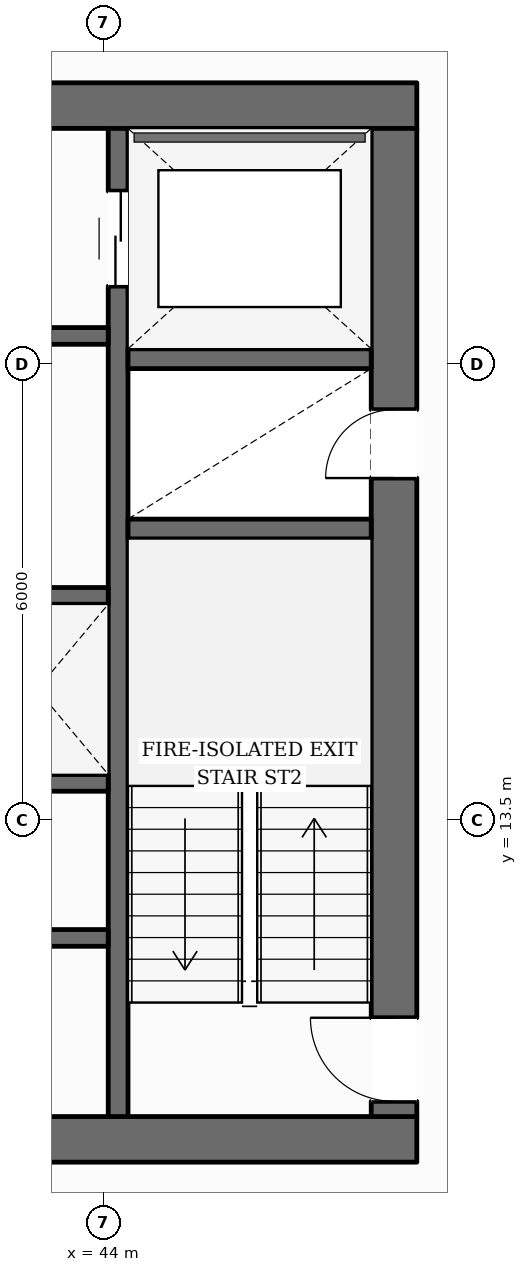
"""IFC4 building model, lengths in metres.
Left out: names, types, materials, properties, quantities, classifications, styles, units other than length and angle.
Written with IfcOpenShell. Run it as: python <this file> out.ifc"""

import sys

from ifc_helpers import new_model, si_unit, direction, frame, frame_2d, origin, place, context, subcontext, project, spatial, rectangle, extrude, element, fill, save


model = new_model("IFC4")
c1 = context("Model", 3, precision=1e-05, world=origin(), true_north=direction((0.0, 1.0)))
c2 = subcontext(c1, "Body", "Model", "MODEL_VIEW")
j1 = project(units=[si_unit("LENGTHUNIT", "METRE"), si_unit("PLANEANGLEUNIT", "RADIAN")], contexts=[c1])
p1 = place(None, origin())
s1 = spatial("IfcSite", under=j1, at=p1, CompositionType="ELEMENT")
p2 = place(p1, origin())
s2 = spatial("IfcBuilding", under=s1, at=p2, CompositionType="ELEMENT")
p3 = place(p2, frame((0.0, 0.0, 56.05)))
s3 = spatial("IfcBuildingStorey", under=s2, at=p3, CompositionType="ELEMENT", Elevation=56.05)
p4 = place(p3, frame((27.88, 9.3, 0.0), z_axis=(0.0, 0.0, 1.0), x_axis=(1.0, 0.0, 0.0)))
e1 = element("IfcWall", 1, at=p4, inside=s3, PredefinedType="SOLIDWALL", context=c2, shape_type="SweptSolid", body=[
    extrude(rectangle(XDim=20.24, YDim=0.6, at=frame_2d((10.12, 0.0))), origin(), (0.0, 0.0, 1.0), 3.59),
])
p5 = place(p4, frame((10.62, 0.0, 0.0)))
e2 = element("IfcOpeningElement", 2, at=p5, cuts=e1, PredefinedType="OPENING", context=c2, shape_type="SweptSolid", body=[
    extrude(rectangle(XDim=1.4, YDim=2.2, at=frame_2d((0.7, 1.1))), frame((0.0, 0.31, 0.0), z_axis=(0.0, -1.0, 0.0), x_axis=(1.0, 0.0, 0.0)), (0.0, 0.0, 1.0), 0.62),
])
p6 = place(p3, frame((27.88, 22.9, 0.0), z_axis=(0.0, 0.0, 1.0), x_axis=(1.0, 0.0, 0.0)))
e3 = element("IfcWall", 3, at=p6, inside=s3, PredefinedType="SOLIDWALL", context=c2, shape_type="SweptSolid", body=[
    extrude(rectangle(XDim=20.24, YDim=0.6, at=frame_2d((10.12, 0.0))), origin(), (0.0, 0.0, 1.0), 3.59),
])
p7 = place(p6, frame((6.395, 0.0, 0.0)))
e4 = element("IfcOpeningElement", 4, at=p7, cuts=e3, PredefinedType="OPENING", context=c2, shape_type="SweptSolid", body=[
    extrude(rectangle(XDim=1.05, YDim=2.15, at=frame_2d((0.525, 1.075))), frame((0.0, 0.31, 0.0), z_axis=(0.0, -1.0, 0.0), x_axis=(1.0, 0.0, 0.0)), (0.0, 0.0, 1.0), 0.62),
])
p8 = place(p6, frame((12.795, 0.0, 0.0)))
e5 = element("IfcOpeningElement", 5, at=p8, cuts=e3, PredefinedType="OPENING", context=c2, shape_type="SweptSolid", body=[
    extrude(rectangle(XDim=1.05, YDim=2.15, at=frame_2d((0.525, 1.075))), frame((0.0, 0.31, 0.0), z_axis=(0.0, -1.0, 0.0), x_axis=(1.0, 0.0, 0.0)), (0.0, 0.0, 1.0), 0.62),
])
p9 = place(p3, frame((47.82, 9.6, 0.0), z_axis=(0.0, 0.0, 1.0), x_axis=(0.0, 1.0, 0.0)))
e6 = element("IfcWall", 6, at=p9, inside=s3, PredefinedType="SOLIDWALL", context=c2, shape_type="SweptSolid", body=[
    extrude(rectangle(XDim=13.0, YDim=0.6, at=frame_2d((6.5, 0.0))), origin(), (0.0, 0.0, 1.0), 3.59),
])
p10 = place(p9, frame((0.2, 0.0, 0.0)))
e7 = element("IfcOpeningElement", 7, at=p10, cuts=e6, PredefinedType="OPENING", context=c2, shape_type="SweptSolid", body=[
    extrude(rectangle(XDim=1.1, YDim=2.15, at=frame_2d((0.55, 1.075))), frame((0.0, 0.31, 0.0), z_axis=(0.0, -1.0, 0.0), x_axis=(1.0, 0.0, 0.0)), (0.0, 0.0, 1.0), 0.62),
])
p11 = place(p9, frame((8.4, 0.0, 0.0)))
e8 = element("IfcOpeningElement", 8, at=p11, cuts=e6, PredefinedType="OPENING", context=c2, shape_type="SweptSolid", body=[
    extrude(rectangle(XDim=0.9, YDim=2.1, at=frame_2d((0.45, 1.05))), frame((0.0, 0.31, 0.0), z_axis=(0.0, -1.0, 0.0), x_axis=(1.0, 0.0, 0.0)), (0.0, 0.0, 1.0), 0.62),
])
p12 = place(p3, frame((44.19, 9.6, 0.0), z_axis=(0.0, 0.0, 1.0), x_axis=(0.0, 1.0, 0.0)))
e9 = element("IfcWall", 9, at=p12, inside=s3, PredefinedType="SHEAR", context=c2, shape_type="SweptSolid", body=[
    extrude(rectangle(XDim=13.0, YDim=0.26, at=frame_2d((6.5, 0.0))), origin(), (0.0, 0.0, 1.0), 3.59),
])
p13 = place(p12, frame((10.925, 0.0, 0.0)))
e10 = element("IfcOpeningElement", 10, at=p13, cuts=e9, PredefinedType="OPENING", context=c2, shape_type="SweptSolid", body=[
    extrude(rectangle(XDim=1.25, YDim=2.25, at=frame_2d((0.625, 1.125))), frame((0.0, 0.14, 0.0), z_axis=(0.0, -1.0, 0.0), x_axis=(1.0, 0.0, 0.0)), (0.0, 0.0, 1.0), 0.28),
])
for number, where, z_axis, x_axis in (
    (11, (44.32, 17.33, 0.0), (0.0, 0.0, 1.0), (1.0, 0.0, 0.0)),
    (12, (44.32, 19.57, 0.0), (0.0, 0.0, 1.0), (1.0, 0.0, 0.0)),
):
    element("IfcWall", number, at=place(p3, frame(where, z_axis=z_axis, x_axis=x_axis)), inside=s3, PredefinedType="SHEAR", context=c2, shape_type="SweptSolid", body=[
        extrude(rectangle(XDim=3.2, YDim=0.26, at=frame_2d((1.6, 0.0))), origin(), (0.0, 0.0, 1.0), 3.59),
    ])
p14 = place(p3, frame((31.94, 19.87, 0.0), z_axis=(0.0, 0.0, 1.0), x_axis=(1.0, 0.0, 0.0)))
e13 = element("IfcWall", 13, at=p14, inside=s3, PredefinedType="SOLIDWALL", context=c2, shape_type="SweptSolid", body=[
    extrude(rectangle(XDim=12.12, YDim=0.22, at=frame_2d((6.06, 0.0))), origin(), (0.0, 0.0, 1.0), 3.59),
])
p15 = place(p14, frame((6.3, 0.0, 0.0)))
e14 = element("IfcOpeningElement", 14, at=p15, cuts=e13, PredefinedType="OPENING", context=c2, shape_type="SweptSolid", body=[
    extrude(rectangle(XDim=1.1, YDim=2.15, at=frame_2d((0.55, 1.075))), frame((0.0, 0.12, 0.0), z_axis=(0.0, -1.0, 0.0), x_axis=(1.0, 0.0, 0.0)), (0.0, 0.0, 1.0), 0.24),
])
p16 = place(p14, frame((8.23, 0.0, 0.0)))
e15 = element("IfcOpeningElement", 15, at=p16, cuts=e13, PredefinedType="OPENING", context=c2, shape_type="SweptSolid", body=[
    extrude(rectangle(XDim=0.9, YDim=2.1, at=frame_2d((0.45, 1.05))), frame((0.0, 0.12, 0.0), z_axis=(0.0, -1.0, 0.0), x_axis=(1.0, 0.0, 0.0)), (0.0, 0.0, 1.0), 0.24),
])
p17 = place(p14, frame((10.45, 0.0, 0.0)))
e16 = element("IfcOpeningElement", 16, at=p17, cuts=e13, PredefinedType="OPENING", context=c2, shape_type="SweptSolid", body=[
    extrude(rectangle(XDim=0.9, YDim=2.1, at=frame_2d((0.45, 1.05))), frame((0.0, 0.12, 0.0), z_axis=(0.0, -1.0, 0.0), x_axis=(1.0, 0.0, 0.0)), (0.0, 0.0, 1.0), 0.24),
])
p18 = place(p3, frame((31.94, 16.45, 0.0), z_axis=(0.0, 0.0, 1.0), x_axis=(1.0, 0.0, 0.0)))
e17 = element("IfcWall", 17, at=p18, inside=s3, PredefinedType="SOLIDWALL", context=c2, shape_type="SweptSolid", body=[
    extrude(rectangle(XDim=12.12, YDim=0.22, at=frame_2d((6.06, 0.0))), origin(), (0.0, 0.0, 1.0), 3.59),
])
p19 = place(p3, frame((31.94, 13.99, 0.0), z_axis=(0.0, 0.0, 1.0), x_axis=(1.0, 0.0, 0.0)))
e18 = element("IfcWall", 18, at=p19, inside=s3, PredefinedType="SOLIDWALL", context=c2, shape_type="SweptSolid", body=[
    extrude(rectangle(XDim=12.12, YDim=0.22, at=frame_2d((6.06, 0.0))), origin(), (0.0, 0.0, 1.0), 3.59),
])
p20 = place(p19, frame((0.385, 0.0, 0.0)))
e19 = element("IfcOpeningElement", 19, at=p20, cuts=e18, PredefinedType="OPENING", context=c2, shape_type="SweptSolid", body=[
    extrude(rectangle(XDim=1.1, YDim=2.2, at=frame_2d((0.55, 1.1))), frame((0.0, 0.12, 0.0), z_axis=(0.0, -1.0, 0.0), x_axis=(1.0, 0.0, 0.0)), (0.0, 0.0, 1.0), 0.24),
])
p21 = place(p19, frame((2.435, 0.0, 0.0)))
e20 = element("IfcOpeningElement", 20, at=p21, cuts=e18, PredefinedType="OPENING", context=c2, shape_type="SweptSolid", body=[
    extrude(rectangle(XDim=1.1, YDim=2.2, at=frame_2d((0.55, 1.1))), frame((0.0, 0.12, 0.0), z_axis=(0.0, -1.0, 0.0), x_axis=(1.0, 0.0, 0.0)), (0.0, 0.0, 1.0), 0.24),
])
p22 = place(p19, frame((4.485, 0.0, 0.0)))
e21 = element("IfcOpeningElement", 21, at=p22, cuts=e18, PredefinedType="OPENING", context=c2, shape_type="SweptSolid", body=[
    extrude(rectangle(XDim=1.1, YDim=2.2, at=frame_2d((0.55, 1.1))), frame((0.0, 0.12, 0.0), z_axis=(0.0, -1.0, 0.0), x_axis=(1.0, 0.0, 0.0)), (0.0, 0.0, 1.0), 0.24),
])
p23 = place(p3, frame((40.28, 11.95, 0.0), z_axis=(0.0, 0.0, 1.0), x_axis=(1.0, 0.0, 0.0)))
e22 = element("IfcWall", 22, at=p23, inside=s3, PredefinedType="SOLIDWALL", context=c2, shape_type="SweptSolid", body=[
    extrude(rectangle(XDim=3.78, YDim=0.22, at=frame_2d((1.89, 0.0))), origin(), (0.0, 0.0, 1.0), 3.59),
])
p24 = place(p23, frame((1.55, 0.0, 0.0)))
e23 = element("IfcOpeningElement", 23, at=p24, cuts=e22, PredefinedType="OPENING", context=c2, shape_type="SweptSolid", body=[
    extrude(rectangle(XDim=0.9, YDim=2.1, at=frame_2d((0.45, 1.05))), frame((0.0, 0.12, 0.0), z_axis=(0.0, -1.0, 0.0), x_axis=(1.0, 0.0, 0.0)), (0.0, 0.0, 1.0), 0.24),
])
p25 = place(p3, frame((45.376, 44.376, 0.0), z_axis=(0.0, 0.0, 1.0), x_axis=(0.505310833403, -0.862937403087, 0.0)))
e24 = element("IfcWall", 24, at=p25, inside=s3, PredefinedType="STANDARD", context=c2, shape_type="SweptSolid", body=[
    extrude(rectangle(XDim=35.544, YDim=0.38, at=frame_2d((17.772, 0.0))), origin(), (0.0, 0.0, 1.0), 2.97),
])
p26 = place(p25, frame((8.486, 0.0, 0.0)))
e25 = element("IfcOpeningElement", 25, at=p26, cuts=e24, PredefinedType="OPENING", context=c2, shape_type="SweptSolid", body=[
    extrude(rectangle(XDim=1.0, YDim=2.2, at=frame_2d((0.5, 1.1))), frame((0.0, 0.2, 0.0), z_axis=(0.0, -1.0, 0.0), x_axis=(1.0, 0.0, 0.0)), (0.0, 0.0, 1.0), 0.4),
])
p27 = place(p25, frame((31.356, 0.0, 0.65)))
e26 = element("IfcOpeningElement", 26, at=p27, cuts=e24, PredefinedType="OPENING", context=c2, shape_type="SweptSolid", body=[
    extrude(rectangle(XDim=1.65, YDim=1.75, at=frame_2d((0.825, 0.875))), frame((0.0, 0.2, 0.0), z_axis=(0.0, -1.0, 0.0), x_axis=(1.0, 0.0, 0.0)), (0.0, 0.0, 1.0), 0.4),
])
p28 = place(p25, frame((25.591, 0.0, 0.65)))
e27 = element("IfcOpeningElement", 27, at=p28, cuts=e24, PredefinedType="OPENING", context=c2, shape_type="SweptSolid", body=[
    extrude(rectangle(XDim=1.65, YDim=1.75, at=frame_2d((0.825, 0.875))), frame((0.0, 0.2, 0.0), z_axis=(0.0, -1.0, 0.0), x_axis=(1.0, 0.0, 0.0)), (0.0, 0.0, 1.0), 0.4),
])
p29 = place(p25, frame((19.826, 0.0, 0.65)))
e28 = element("IfcOpeningElement", 28, at=p29, cuts=e24, PredefinedType="OPENING", context=c2, shape_type="SweptSolid", body=[
    extrude(rectangle(XDim=1.65, YDim=1.75, at=frame_2d((0.825, 0.875))), frame((0.0, 0.2, 0.0), z_axis=(0.0, -1.0, 0.0), x_axis=(1.0, 0.0, 0.0)), (0.0, 0.0, 1.0), 0.4),
])
p30 = place(p25, frame((2.532, 0.0, 0.65)))
e29 = element("IfcOpeningElement", 29, at=p30, cuts=e24, PredefinedType="OPENING", context=c2, shape_type="SweptSolid", body=[
    extrude(rectangle(XDim=1.65, YDim=1.75, at=frame_2d((0.825, 0.875))), frame((0.0, 0.2, 0.0), z_axis=(0.0, -1.0, 0.0), x_axis=(1.0, 0.0, 0.0)), (0.0, 0.0, 1.0), 0.4),
])
p31 = place(p10, origin())
e30 = element("IfcDoor", 30, at=p31, inside=s3, OperationType="SINGLE_SWING_RIGHT", PredefinedType="DOOR", context=c2, shape_type="SweptSolid", body=[
    extrude(rectangle(XDim=1.1, YDim=2.15, at=frame_2d((0.55, 1.075))), frame((0.0, 0.025, 0.0), z_axis=(0.0, -1.0, 0.0), x_axis=(1.0, 0.0, 0.0)), (0.0, 0.0, 1.0), 0.05),
])
fill(e7, e30)
p32 = place(p11, origin())
e31 = element("IfcDoor", 31, at=p32, inside=s3, OperationType="SINGLE_SWING_LEFT", PredefinedType="DOOR", context=c2, shape_type="SweptSolid", body=[
    extrude(rectangle(XDim=0.9, YDim=2.1, at=frame_2d((0.45, 1.05))), frame((0.0, 0.025, 0.0), z_axis=(0.0, -1.0, 0.0), x_axis=(1.0, 0.0, 0.0)), (0.0, 0.0, 1.0), 0.05),
])
fill(e8, e31)
p33 = place(p13, origin())
e32 = element("IfcDoor", 32, at=p33, inside=s3, OperationType="DOUBLE_DOOR_SLIDING", PredefinedType="DOOR", context=c2, shape_type="SweptSolid", body=[
    extrude(rectangle(XDim=1.25, YDim=2.25, at=frame_2d((0.625, 1.125))), frame((0.0, 0.025, 0.0), z_axis=(0.0, -1.0, 0.0), x_axis=(1.0, 0.0, 0.0)), (0.0, 0.0, 1.0), 0.05),
])
fill(e10, e32)
save(model, sys.argv[1])
